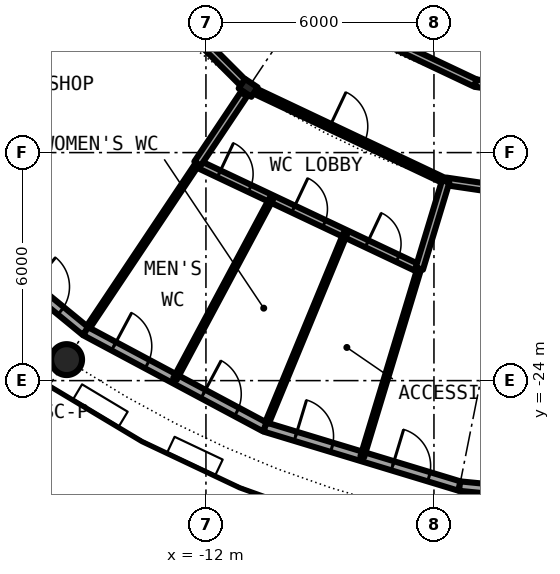
"""IFC4 building model, lengths in metres.
Left out: names, types, materials, properties, quantities, classifications, styles, units other than length and angle.
Written with IfcOpenShell. Run it as: python <this file> out.ifc"""

import sys

from ifc_helpers import new_model, si_unit, direction, frame, frame_2d, origin, origin_2d, place, context, subcontext, project, spatial, rectangle, hollow_circle, i_section, extrude, element, fill, save


model = new_model("IFC4")
c1 = context("Model", 3, precision=1e-05, world=origin(), true_north=direction((0.0, 1.0)))
c2 = subcontext(c1, "Body", "Model", "MODEL_VIEW")
j1 = project(units=[si_unit("LENGTHUNIT", "METRE"), si_unit("PLANEANGLEUNIT", "RADIAN")], contexts=[c1])
p1 = place(None, origin())
s1 = spatial("IfcSite", under=j1, at=p1, CompositionType="ELEMENT")
p2 = place(p1, origin())
s2 = spatial("IfcBuilding", under=s1, at=p2, CompositionType="ELEMENT")
p3 = place(p2, frame((0.0, 0.0, 208.5)))
s3 = spatial("IfcBuildingStorey", under=s2, at=p3, CompositionType="ELEMENT", Elevation=208.5)
p4 = place(p3, frame((-15.667, -23.448, 0.0), z_axis=(0.0, 0.0, 1.0), x_axis=(1.0, 0.0, 0.0)))
e1 = element("IfcColumn", 1, at=p4, inside=s3, PredefinedType="COLUMN", context=c2, shape_type="SweptSolid", body=[
    extrude(hollow_circle(Radius=0.406, WallThickness=0.03, at=origin_2d()), origin(), (0.0, 0.0, 1.0), 4.2),
])
p5 = place(p3, frame((-10.889, -16.297, 0.0), z_axis=(0.0, 0.0, 1.0), x_axis=(-0.55557023302, -0.831469612303, 0.0)))
e2 = element("IfcColumn", 2, at=p5, inside=s3, PredefinedType="COLUMN", context=c2, shape_type="SweptSolid", body=[
    extrude(i_section(OverallWidth=0.3, OverallDepth=0.4, WebThickness=0.013, FlangeThickness=0.024, FilletRadius=0.027, at=origin_2d()), origin(), (0.0, 0.0, 1.0), 4.2),
])
p6 = place(p3, frame((-19.304, -19.304, 0.0), z_axis=(0.0, 0.0, 1.0), x_axis=(0.773019449054, -0.634382322723, 0.0)))
e3 = element("IfcWall", 3, at=p6, inside=s3, PredefinedType="SOLIDWALL", context=c2, shape_type="SweptSolid", body=[
    extrude(rectangle(XDim=5.352, YDim=0.25, at=frame_2d((2.676, 0.0))), origin(), (0.0, 0.0, 1.0), 3.85),
])
p7 = place(p6, frame((0.841, 0.0, 0.0)))
e4 = element("IfcOpeningElement", 4, at=p7, cuts=e3, PredefinedType="OPENING", context=c2, shape_type="SweptSolid", body=[
    extrude(rectangle(XDim=1.0, YDim=2.2, at=frame_2d((0.5, 1.1))), frame((0.0, 0.135, 0.0), z_axis=(0.0, -1.0, 0.0), x_axis=(1.0, 0.0, 0.0)), (0.0, 0.0, 1.0), 0.27),
])
p8 = place(p6, frame((3.51, 0.0, 0.0)))
e5 = element("IfcOpeningElement", 5, at=p8, cuts=e3, PredefinedType="OPENING", context=c2, shape_type="SweptSolid", body=[
    extrude(rectangle(XDim=1.0, YDim=2.2, at=frame_2d((0.5, 1.1))), frame((0.0, 0.135, 0.0), z_axis=(0.0, -1.0, 0.0), x_axis=(1.0, 0.0, 0.0)), (0.0, 0.0, 1.0), 0.27),
])
p9 = place(p3, frame((-15.167, -22.699, 0.0), z_axis=(0.0, 0.0, 1.0), x_axis=(0.881915646801, -0.471407246368, 0.0)))
e6 = element("IfcWall", 6, at=p9, inside=s3, PredefinedType="SOLIDWALL", context=c2, shape_type="SweptSolid", body=[
    extrude(rectangle(XDim=5.352, YDim=0.25, at=frame_2d((2.676, 0.0))), origin(), (0.0, 0.0, 1.0), 3.85),
])
p10 = place(p9, frame((0.841, 0.0, 0.0)))
e7 = element("IfcOpeningElement", 7, at=p10, cuts=e6, PredefinedType="OPENING", context=c2, shape_type="SweptSolid", body=[
    extrude(rectangle(XDim=1.0, YDim=2.2, at=frame_2d((0.5, 1.1))), frame((0.0, 0.135, 0.0), z_axis=(0.0, -1.0, 0.0), x_axis=(1.0, 0.0, 0.0)), (0.0, 0.0, 1.0), 0.27),
])
p11 = place(p9, frame((3.51, 0.0, 0.0)))
e8 = element("IfcOpeningElement", 8, at=p11, cuts=e6, PredefinedType="OPENING", context=c2, shape_type="SweptSolid", body=[
    extrude(rectangle(XDim=1.0, YDim=2.2, at=frame_2d((0.5, 1.1))), frame((0.0, 0.135, 0.0), z_axis=(0.0, -1.0, 0.0), x_axis=(1.0, 0.0, 0.0)), (0.0, 0.0, 1.0), 0.27),
])
p12 = place(p3, frame((-10.447, -25.222, 0.0), z_axis=(0.0, 0.0, 1.0), x_axis=(0.956965678721, -0.290201119486, 0.0)))
e9 = element("IfcWall", 9, at=p12, inside=s3, PredefinedType="SOLIDWALL", context=c2, shape_type="SweptSolid", body=[
    extrude(rectangle(XDim=5.351, YDim=0.25, at=frame_2d((2.676, 0.0))), origin(), (0.0, 0.0, 1.0), 3.85),
])
p13 = place(p12, frame((0.841, 0.0, 0.0)))
e10 = element("IfcOpeningElement", 10, at=p13, cuts=e9, PredefinedType="OPENING", context=c2, shape_type="SweptSolid", body=[
    extrude(rectangle(XDim=1.0, YDim=2.2, at=frame_2d((0.5, 1.1))), frame((0.0, 0.135, 0.0), z_axis=(0.0, -1.0, 0.0), x_axis=(1.0, 0.0, 0.0)), (0.0, 0.0, 1.0), 0.27),
])
p14 = place(p12, frame((3.51, 0.0, 0.0)))
e11 = element("IfcOpeningElement", 11, at=p14, cuts=e9, PredefinedType="OPENING", context=c2, shape_type="SweptSolid", body=[
    extrude(rectangle(XDim=1.0, YDim=2.2, at=frame_2d((0.5, 1.1))), frame((0.0, 0.135, 0.0), z_axis=(0.0, -1.0, 0.0), x_axis=(1.0, 0.0, 0.0)), (0.0, 0.0, 1.0), 0.27),
])
p15 = place(p3, frame((-5.326, -26.775, 0.0), z_axis=(0.0, 0.0, 1.0), x_axis=(0.995173996315, -0.098126026407, 0.0)))
e12 = element("IfcWall", 12, at=p15, inside=s3, PredefinedType="SOLIDWALL", context=c2, shape_type="SweptSolid", body=[
    extrude(rectangle(XDim=5.352, YDim=0.25, at=frame_2d((2.676, 0.0))), origin(), (0.0, 0.0, 1.0), 3.85),
])
p16 = place(p15, frame((0.841, 0.0, 0.0)))
e13 = element("IfcOpeningElement", 13, at=p16, cuts=e12, PredefinedType="OPENING", context=c2, shape_type="SweptSolid", body=[
    extrude(rectangle(XDim=1.0, YDim=2.2, at=frame_2d((0.5, 1.1))), frame((0.0, 0.135, 0.0), z_axis=(0.0, -1.0, 0.0), x_axis=(1.0, 0.0, 0.0)), (0.0, 0.0, 1.0), 0.27),
])
p17 = place(p15, frame((3.51, 0.0, 0.0)))
e14 = element("IfcOpeningElement", 14, at=p17, cuts=e12, PredefinedType="OPENING", context=c2, shape_type="SweptSolid", body=[
    extrude(rectangle(XDim=1.0, YDim=2.2, at=frame_2d((0.5, 1.1))), frame((0.0, 0.135, 0.0), z_axis=(0.0, -1.0, 0.0), x_axis=(1.0, 0.0, 0.0)), (0.0, 0.0, 1.0), 0.27),
])
p18 = place(p3, frame((-12.223, -18.294, 0.0), z_axis=(0.0, 0.0, 1.0), x_axis=(0.904110764787, -0.427298168726, 0.0)))
e15 = element("IfcWall", 15, at=p18, inside=s3, PredefinedType="PARTITIONING", context=c2, shape_type="SweptSolid", body=[
    extrude(rectangle(XDim=6.459, YDim=0.2, at=frame_2d((3.229, 0.0))), origin(), (0.0, 0.0, 1.0), 3.85),
])
p19 = place(p18, frame((0.624, 0.0, 0.0)))
e16 = element("IfcOpeningElement", 16, at=p19, cuts=e15, PredefinedType="OPENING", context=c2, shape_type="SweptSolid", body=[
    extrude(rectangle(XDim=0.9, YDim=2.3, at=frame_2d((0.45, 1.15))), frame((0.0, 0.11, 0.0), z_axis=(0.0, -1.0, 0.0), x_axis=(1.0, 0.0, 0.0)), (0.0, 0.0, 1.0), 0.22),
])
p20 = place(p18, frame((2.788, 0.0, 0.0)))
e17 = element("IfcOpeningElement", 17, at=p20, cuts=e15, PredefinedType="OPENING", context=c2, shape_type="SweptSolid", body=[
    extrude(rectangle(XDim=0.9, YDim=2.3, at=frame_2d((0.45, 1.15))), frame((0.0, 0.11, 0.0), z_axis=(0.0, -1.0, 0.0), x_axis=(1.0, 0.0, 0.0)), (0.0, 0.0, 1.0), 0.22),
])
p21 = place(p18, frame((4.93, 0.0, 0.0)))
e18 = element("IfcOpeningElement", 18, at=p21, cuts=e15, PredefinedType="OPENING", context=c2, shape_type="SweptSolid", body=[
    extrude(rectangle(XDim=0.9, YDim=2.3, at=frame_2d((0.45, 1.15))), frame((0.0, 0.11, 0.0), z_axis=(0.0, -1.0, 0.0), x_axis=(1.0, 0.0, 0.0)), (0.0, 0.0, 1.0), 0.22),
])
p22 = place(p3, frame((-10.752, -16.362, 0.0), z_axis=(0.0, 0.0, 1.0), x_axis=(0.903996904196, -0.427539000798, 0.0)))
e19 = element("IfcWall", 19, at=p22, inside=s3, PredefinedType="PARTITIONING", context=c2, shape_type="SweptSolid", body=[
    extrude(rectangle(XDim=5.6, YDim=0.15, at=frame_2d((2.8, 0.0))), origin(), (0.0, 0.0, 1.0), 3.6),
])
p23 = place(p22, frame((2.224, 0.0, 0.0)))
e20 = element("IfcOpeningElement", 20, at=p23, cuts=e19, PredefinedType="OPENING", context=c2, shape_type="SweptSolid", body=[
    extrude(rectangle(XDim=1.0, YDim=2.3, at=frame_2d((0.5, 1.15))), frame((0.0, 0.085, 0.0), z_axis=(0.0, -1.0, 0.0), x_axis=(1.0, 0.0, 0.0)), (0.0, 0.0, 1.0), 0.17),
])
p24 = place(p3, frame((-5.69, -18.756, 0.0), z_axis=(0.0, 0.0, 1.0), x_axis=(0.989189411235, -0.1466434748, 0.0)))
e21 = element("IfcWall", 21, at=p24, inside=s3, PredefinedType="PARTITIONING", context=c2, shape_type="SweptSolid", body=[
    extrude(rectangle(XDim=1.773, YDim=0.2, at=frame_2d((0.887, 0.0))), origin(), (0.0, 0.0, 1.0), 3.6),
])
p25 = place(p3, frame((-16.189, -10.997, 0.0), z_axis=(0.0, 0.0, 1.0), x_axis=(0.707106781187, -0.707106781187, 0.0)))
e22 = element("IfcWall", 22, at=p25, inside=s3, PredefinedType="PARTITIONING", context=c2, shape_type="SweptSolid", body=[
    extrude(rectangle(XDim=7.343, YDim=0.2, at=frame_2d((3.671, 0.0))), origin(), (0.0, 0.0, 1.0), 3.6),
])
p26 = place(p25, frame((3.171, 0.0, 0.0)))
e23 = element("IfcOpeningElement", 23, at=p26, cuts=e22, PredefinedType="OPENING", context=c2, shape_type="SweptSolid", body=[
    extrude(rectangle(XDim=1.0, YDim=2.3, at=frame_2d((0.5, 1.15))), frame((0.0, 0.11, 0.0), z_axis=(0.0, -1.0, 0.0), x_axis=(1.0, 0.0, 0.0)), (0.0, 0.0, 1.0), 0.22),
])
p27 = place(p3, frame((-9.389, -14.052, 0.0), z_axis=(0.0, 0.0, 1.0), x_axis=(0.904000314399, -0.427531790123, 0.0)))
e24 = element("IfcWall", 24, at=p27, inside=s3, PredefinedType="PARTITIONING", context=c2, shape_type="SweptSolid", body=[
    extrude(rectangle(XDim=4.959, YDim=0.2, at=frame_2d((2.479, 0.0))), origin(), (0.0, 0.0, 1.0), 3.85),
])
p28 = place(p3, frame((-4.906, -16.172, 0.0), z_axis=(0.0, 0.0, 1.0), x_axis=(0.989175164373, -0.146739545409, 0.0)))
e25 = element("IfcWall", 25, at=p28, inside=s3, PredefinedType="PARTITIONING", context=c2, shape_type="SweptSolid", body=[
    extrude(rectangle(XDim=4.96, YDim=0.2, at=frame_2d((2.48, 0.0))), origin(), (0.0, 0.0, 1.0), 3.85),
])
p29 = place(p28, frame((1.98, 0.0, 0.0)))
e26 = element("IfcOpeningElement", 26, at=p29, cuts=e25, PredefinedType="OPENING", context=c2, shape_type="SweptSolid", body=[
    extrude(rectangle(XDim=1.0, YDim=2.3, at=frame_2d((0.5, 1.15))), frame((0.0, 0.11, 0.0), z_axis=(0.0, -1.0, 0.0), x_axis=(1.0, 0.0, 0.0)), (0.0, 0.0, 1.0), 0.22),
])
p30 = place(p3, frame((-15.098, -22.595, 0.0), z_axis=(0.0, 0.0, 1.0), x_axis=(0.555679526155, 0.831396574573, 0.0)))
e27 = element("IfcWall", 27, at=p30, inside=s3, PredefinedType="PARTITIONING", context=c2, shape_type="SweptSolid", body=[
    extrude(rectangle(XDim=5.176, YDim=0.1, at=frame_2d((2.588, 0.0))), origin(), (0.0, 0.0, 1.0), 3.85),
])
p31 = place(p3, frame((-12.818, -23.962, 0.0), z_axis=(0.0, 0.0, 1.0), x_axis=(0.471698142177, 0.881760093601, 0.0)))
e28 = element("IfcWall", 28, at=p31, inside=s3, PredefinedType="PARTITIONING", context=c2, shape_type="SweptSolid", body=[
    extrude(rectangle(XDim=5.387, YDim=0.1, at=frame_2d((2.693, 0.0))), origin(), (0.0, 0.0, 1.0), 3.85),
])
p32 = place(p3, frame((-12.222, -18.292, 0.0), z_axis=(0.0, 0.0, 1.0), x_axis=(0.555493933307, 0.831520589077, 0.0)))
e29 = element("IfcWall", 29, at=p32, inside=s3, PredefinedType="PARTITIONING", context=c2, shape_type="SweptSolid", body=[
    extrude(rectangle(XDim=2.2, YDim=0.2, at=frame_2d((1.1, 0.0))), origin(), (0.0, 0.0, 1.0), 3.85),
])
p33 = place(p3, frame((-10.391, -25.11, 0.0), z_axis=(0.0, 0.0, 1.0), x_axis=(0.38229040446, 0.924042232075, 0.0)))
e30 = element("IfcWall", 30, at=p33, inside=s3, PredefinedType="PARTITIONING", context=c2, shape_type="SweptSolid", body=[
    extrude(rectangle(XDim=5.386, YDim=0.1, at=frame_2d((2.693, 0.0))), origin(), (0.0, 0.0, 1.0), 3.85),
])
p34 = place(p3, frame((-7.887, -26.005, 0.0), z_axis=(0.0, 0.0, 1.0), x_axis=(0.290078108742, 0.95700297326, 0.0)))
e31 = element("IfcWall", 31, at=p34, inside=s3, PredefinedType="PARTITIONING", context=c2, shape_type="SweptSolid", body=[
    extrude(rectangle(XDim=5.174, YDim=0.1, at=frame_2d((2.587, 0.0))), origin(), (0.0, 0.0, 1.0), 3.85),
])
p35 = place(p3, frame((-6.386, -21.053, 0.0), z_axis=(0.0, 0.0, 1.0), x_axis=(0.290015865164, 0.957021837762, 0.0)))
e32 = element("IfcWall", 32, at=p35, inside=s3, PredefinedType="PARTITIONING", context=c2, shape_type="SweptSolid", body=[
    extrude(rectangle(XDim=2.4, YDim=0.2, at=frame_2d((1.2, 0.0))), origin(), (0.0, 0.0, 1.0), 3.85),
])
p36 = place(p8, origin())
e33 = element("IfcDoor", 33, at=p36, inside=s3, OperationType="SINGLE_SWING_LEFT", PredefinedType="DOOR", context=c2, shape_type="SweptSolid", body=[
    extrude(rectangle(XDim=1.0, YDim=2.2, at=frame_2d((0.5, 1.1))), frame((0.0, 0.025, 0.0), z_axis=(0.0, -1.0, 0.0), x_axis=(1.0, 0.0, 0.0)), (0.0, 0.0, 1.0), 0.05),
])
fill(e5, e33)
p37 = place(p10, origin())
e34 = element("IfcDoor", 34, at=p37, inside=s3, OperationType="SINGLE_SWING_LEFT", PredefinedType="DOOR", context=c2, shape_type="SweptSolid", body=[
    extrude(rectangle(XDim=1.0, YDim=2.2, at=frame_2d((0.5, 1.1))), frame((0.0, 0.025, 0.0), z_axis=(0.0, -1.0, 0.0), x_axis=(1.0, 0.0, 0.0)), (0.0, 0.0, 1.0), 0.05),
])
fill(e7, e34)
p38 = place(p11, origin())
e35 = element("IfcDoor", 35, at=p38, inside=s3, OperationType="SINGLE_SWING_LEFT", PredefinedType="DOOR", context=c2, shape_type="SweptSolid", body=[
    extrude(rectangle(XDim=1.0, YDim=2.2, at=frame_2d((0.5, 1.1))), frame((0.0, 0.025, 0.0), z_axis=(0.0, -1.0, 0.0), x_axis=(1.0, 0.0, 0.0)), (0.0, 0.0, 1.0), 0.05),
])
fill(e8, e35)
p39 = place(p13, origin())
e36 = element("IfcDoor", 36, at=p39, inside=s3, OperationType="SINGLE_SWING_LEFT", PredefinedType="DOOR", context=c2, shape_type="SweptSolid", body=[
    extrude(rectangle(XDim=1.0, YDim=2.2, at=frame_2d((0.5, 1.1))), frame((0.0, 0.025, 0.0), z_axis=(0.0, -1.0, 0.0), x_axis=(1.0, 0.0, 0.0)), (0.0, 0.0, 1.0), 0.05),
])
fill(e10, e36)
p40 = place(p14, origin())
e37 = element("IfcDoor", 37, at=p40, inside=s3, OperationType="SINGLE_SWING_LEFT", PredefinedType="DOOR", context=c2, shape_type="SweptSolid", body=[
    extrude(rectangle(XDim=1.0, YDim=2.2, at=frame_2d((0.5, 1.1))), frame((0.0, 0.025, 0.0), z_axis=(0.0, -1.0, 0.0), x_axis=(1.0, 0.0, 0.0)), (0.0, 0.0, 1.0), 0.05),
])
fill(e11, e37)
p41 = place(p23, origin())
e38 = element("IfcDoor", 38, at=p41, inside=s3, OperationType="SINGLE_SWING_LEFT", PredefinedType="DOOR", context=c2, shape_type="SweptSolid", body=[
    extrude(rectangle(XDim=1.0, YDim=2.3, at=frame_2d((0.5, 1.15))), frame((0.0, 0.025, 0.0), z_axis=(0.0, -1.0, 0.0), x_axis=(1.0, 0.0, 0.0)), (0.0, 0.0, 1.0), 0.05),
])
fill(e20, e38)
p42 = place(p19, origin())
e39 = element("IfcDoor", 39, at=p42, inside=s3, OperationType="SINGLE_SWING_LEFT", PredefinedType="DOOR", context=c2, shape_type="SweptSolid", body=[
    extrude(rectangle(XDim=0.9, YDim=2.3, at=frame_2d((0.45, 1.15))), frame((0.0, 0.025, 0.0), z_axis=(0.0, -1.0, 0.0), x_axis=(1.0, 0.0, 0.0)), (0.0, 0.0, 1.0), 0.05),
])
fill(e16, e39)
p43 = place(p20, origin())
e40 = element("IfcDoor", 40, at=p43, inside=s3, OperationType="SINGLE_SWING_RIGHT", PredefinedType="DOOR", context=c2, shape_type="SweptSolid", body=[
    extrude(rectangle(XDim=0.9, YDim=2.3, at=frame_2d((0.45, 1.15))), frame((0.0, 0.025, 0.0), z_axis=(0.0, -1.0, 0.0), x_axis=(1.0, 0.0, 0.0)), (0.0, 0.0, 1.0), 0.05),
])
fill(e17, e40)
p44 = place(p21, origin())
e41 = element("IfcDoor", 41, at=p44, inside=s3, OperationType="SINGLE_SWING_RIGHT", PredefinedType="DOOR", context=c2, shape_type="SweptSolid", body=[
    extrude(rectangle(XDim=0.9, YDim=2.3, at=frame_2d((0.45, 1.15))), frame((0.0, 0.025, 0.0), z_axis=(0.0, -1.0, 0.0), x_axis=(1.0, 0.0, 0.0)), (0.0, 0.0, 1.0), 0.05),
])
fill(e18, e41)
save(model, sys.argv[1])
